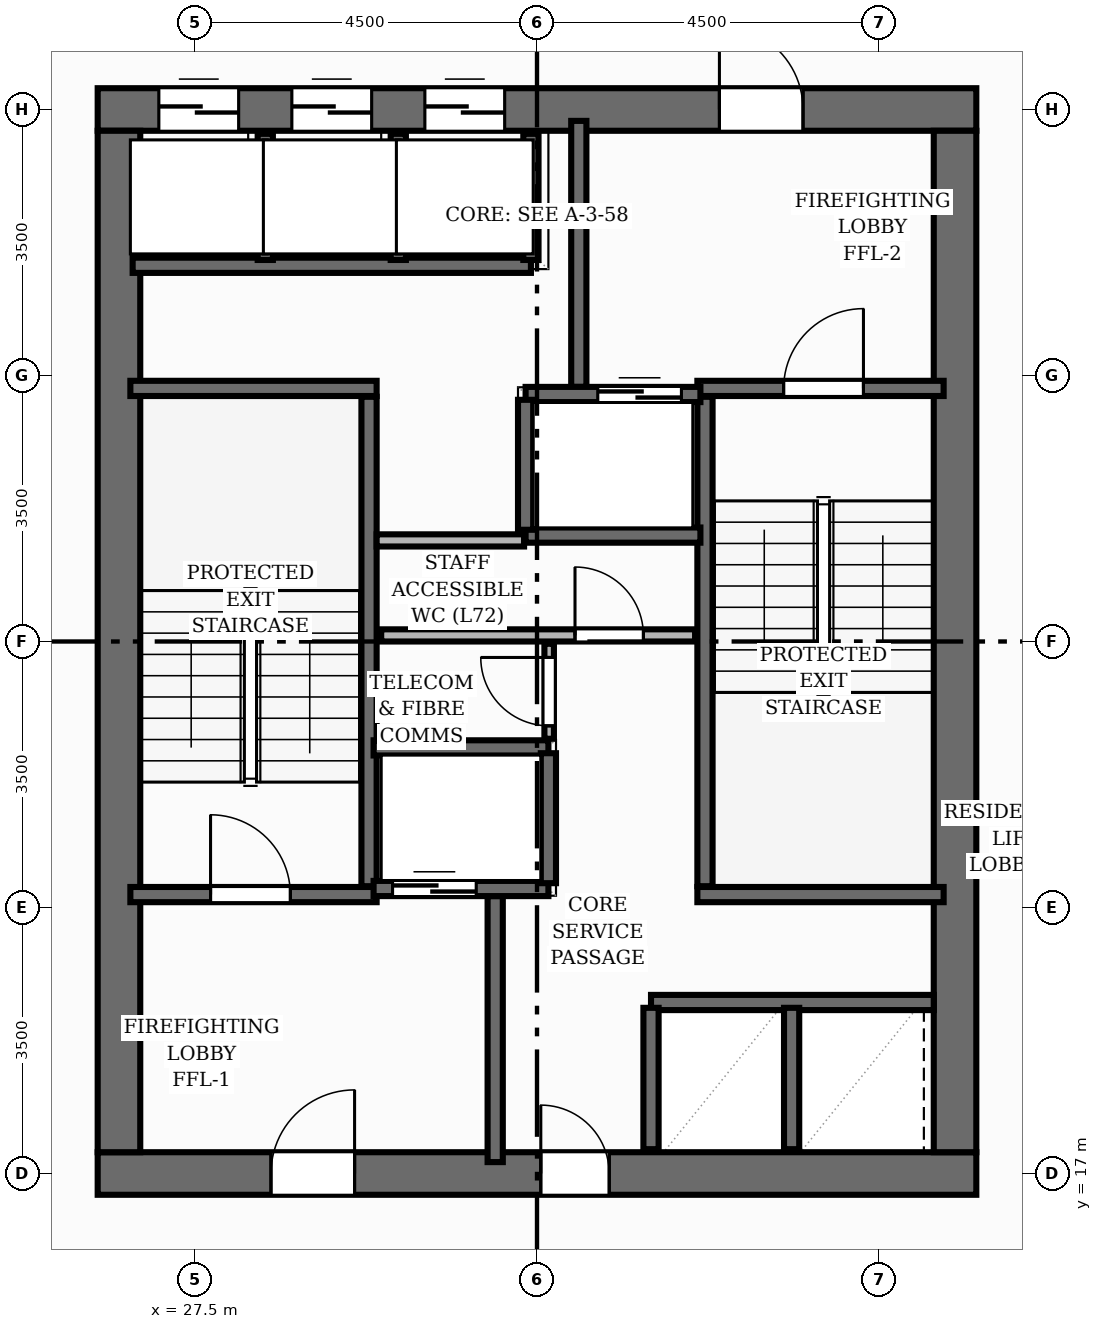
"""IFC4 building model, lengths in metres.
Left out: names, types, materials, properties, quantities, classifications, styles, units other than length and angle.
Written with IfcOpenShell. Run it as: python <this file> out.ifc"""

import sys

from ifc_helpers import new_model, si_unit, direction, frame, frame_2d, origin, place, context, subcontext, project, spatial, rectangle, extrude, element, fill, save


model = new_model("IFC4")
c1 = context("Model", 3, precision=1e-05, world=origin(), true_north=direction((0.0, 1.0)))
c2 = subcontext(c1, "Body", "Model", "MODEL_VIEW")
j1 = project(units=[si_unit("LENGTHUNIT", "METRE"), si_unit("PLANEANGLEUNIT", "RADIAN")], contexts=[c1])
p1 = place(None, origin())
s1 = spatial("IfcSite", under=j1, at=p1, CompositionType="ELEMENT")
p2 = place(p1, origin())
s2 = spatial("IfcBuilding", under=s1, at=p2, CompositionType="ELEMENT")
p3 = place(p2, frame((0.0, 0.0, 239.84)))
s3 = spatial("IfcBuildingStorey", under=s2, at=p3, CompositionType="ELEMENT", Elevation=239.84)
p4 = place(p3, frame((26.22, 17.0, 0.0), z_axis=(0.0, 0.0, 1.0), x_axis=(1.0, 0.0, 0.0)))
e1 = element("IfcWall", 1, at=p4, inside=s3, PredefinedType="SHEAR", context=c2, shape_type="SweptSolid", body=[
    extrude(rectangle(XDim=11.56, YDim=0.56, at=frame_2d((5.78, 0.0))), origin(), (0.0, 0.0, 1.0), 3.2),
])
p5 = place(p4, frame((2.28, 0.0, 0.0)))
e2 = element("IfcOpeningElement", 2, at=p5, cuts=e1, PredefinedType="OPENING", context=c2, shape_type="SweptSolid", body=[
    extrude(rectangle(XDim=1.1, YDim=2.15, at=frame_2d((0.55, 1.075))), frame((0.0, 0.29, 0.0), z_axis=(0.0, -1.0, 0.0), x_axis=(1.0, 0.0, 0.0)), (0.0, 0.0, 1.0), 0.58),
])
p6 = place(p4, frame((5.83, 0.0, 0.0)))
e3 = element("IfcOpeningElement", 3, at=p6, cuts=e1, PredefinedType="OPENING", context=c2, shape_type="SweptSolid", body=[
    extrude(rectangle(XDim=0.9, YDim=2.1, at=frame_2d((0.45, 1.05))), frame((0.0, 0.29, 0.0), z_axis=(0.0, -1.0, 0.0), x_axis=(1.0, 0.0, 0.0)), (0.0, 0.0, 1.0), 0.58),
])
p7 = place(p3, frame((26.22, 31.0, 0.0), z_axis=(0.0, 0.0, 1.0), x_axis=(1.0, 0.0, 0.0)))
e4 = element("IfcWall", 4, at=p7, inside=s3, PredefinedType="SHEAR", context=c2, shape_type="SweptSolid", body=[
    extrude(rectangle(XDim=11.56, YDim=0.56, at=frame_2d((5.78, 0.0))), origin(), (0.0, 0.0, 1.0), 3.2),
])
p8 = place(p7, frame((8.18, 0.0, 0.0)))
e5 = element("IfcOpeningElement", 5, at=p8, cuts=e4, PredefinedType="OPENING", context=c2, shape_type="SweptSolid", body=[
    extrude(rectangle(XDim=1.1, YDim=2.15, at=frame_2d((0.55, 1.075))), frame((0.0, 0.29, 0.0), z_axis=(0.0, -1.0, 0.0), x_axis=(1.0, 0.0, 0.0)), (0.0, 0.0, 1.0), 0.58),
])
p9 = place(p7, frame((0.805, 0.0, 0.0)))
e6 = element("IfcOpeningElement", 6, at=p9, cuts=e4, PredefinedType="OPENING", context=c2, shape_type="SweptSolid", body=[
    extrude(rectangle(XDim=1.05, YDim=2.15, at=frame_2d((0.525, 1.075))), frame((0.0, 0.29, 0.0), z_axis=(0.0, -1.0, 0.0), x_axis=(1.0, 0.0, 0.0)), (0.0, 0.0, 1.0), 0.58),
])
p10 = place(p7, frame((2.555, 0.0, 0.0)))
e7 = element("IfcOpeningElement", 7, at=p10, cuts=e4, PredefinedType="OPENING", context=c2, shape_type="SweptSolid", body=[
    extrude(rectangle(XDim=1.05, YDim=2.15, at=frame_2d((0.525, 1.075))), frame((0.0, 0.29, 0.0), z_axis=(0.0, -1.0, 0.0), x_axis=(1.0, 0.0, 0.0)), (0.0, 0.0, 1.0), 0.58),
])
p11 = place(p7, frame((4.305, 0.0, 0.0)))
e8 = element("IfcOpeningElement", 8, at=p11, cuts=e4, PredefinedType="OPENING", context=c2, shape_type="SweptSolid", body=[
    extrude(rectangle(XDim=1.05, YDim=2.15, at=frame_2d((0.525, 1.075))), frame((0.0, 0.29, 0.0), z_axis=(0.0, -1.0, 0.0), x_axis=(1.0, 0.0, 0.0)), (0.0, 0.0, 1.0), 0.58),
])
for number, where, z_axis, x_axis in (
    (9, (26.5, 17.28, 0.0), (0.0, 0.0, 1.0), (0.0, 1.0, 0.0)),
    (10, (37.5, 17.28, 0.0), (0.0, 0.0, 1.0), (0.0, 1.0, 0.0)),
):
    element("IfcWall", number, at=place(p3, frame(where, z_axis=z_axis, x_axis=x_axis)), inside=s3, PredefinedType="SHEAR", context=c2, shape_type="SweptSolid", body=[
        extrude(rectangle(XDim=13.44, YDim=0.56, at=frame_2d((6.72, 0.0))), origin(), (0.0, 0.0, 1.0), 3.2),
    ])
p12 = place(p3, frame((29.79, 20.78, 0.0), z_axis=(0.0, 0.0, 1.0), x_axis=(0.0, 1.0, 0.0)))
e11 = element("IfcWall", 11, at=p12, inside=s3, PredefinedType="SHEAR", context=c2, shape_type="SweptSolid", body=[
    extrude(rectangle(XDim=6.44, YDim=0.2, at=frame_2d((3.22, 0.0))), origin(), (0.0, 0.0, 1.0), 3.2),
])
p13 = place(p3, frame((26.65, 27.33, 0.0), z_axis=(0.0, 0.0, 1.0), x_axis=(1.0, 0.0, 0.0)))
e12 = element("IfcWall", 12, at=p13, inside=s3, PredefinedType="SHEAR", context=c2, shape_type="SweptSolid", body=[
    extrude(rectangle(XDim=3.24, YDim=0.2, at=frame_2d((1.62, 0.0))), origin(), (0.0, 0.0, 1.0), 3.2),
])
p14 = place(p3, frame((26.65, 20.67, 0.0), z_axis=(0.0, 0.0, 1.0), x_axis=(1.0, 0.0, 0.0)))
e13 = element("IfcWall", 13, at=p14, inside=s3, PredefinedType="SHEAR", context=c2, shape_type="SweptSolid", body=[
    extrude(rectangle(XDim=3.24, YDim=0.2, at=frame_2d((1.62, 0.0))), origin(), (0.0, 0.0, 1.0), 3.2),
])
p15 = place(p14, frame((1.055, 0.0, 0.0)))
e14 = element("IfcOpeningElement", 14, at=p15, cuts=e13, PredefinedType="OPENING", context=c2, shape_type="SweptSolid", body=[
    extrude(rectangle(XDim=1.05, YDim=2.15, at=frame_2d((0.525, 1.075))), frame((0.0, 0.11, 0.0), z_axis=(0.0, -1.0, 0.0), x_axis=(1.0, 0.0, 0.0)), (0.0, 0.0, 1.0), 0.22),
])
p16 = place(p3, frame((34.21, 20.78, 0.0), z_axis=(0.0, 0.0, 1.0), x_axis=(0.0, 1.0, 0.0)))
e15 = element("IfcWall", 15, at=p16, inside=s3, PredefinedType="SHEAR", context=c2, shape_type="SweptSolid", body=[
    extrude(rectangle(XDim=6.44, YDim=0.2, at=frame_2d((3.22, 0.0))), origin(), (0.0, 0.0, 1.0), 3.2),
])
p17 = place(p3, frame((34.11, 20.67, 0.0), z_axis=(0.0, 0.0, 1.0), x_axis=(1.0, 0.0, 0.0)))
e16 = element("IfcWall", 16, at=p17, inside=s3, PredefinedType="SHEAR", context=c2, shape_type="SweptSolid", body=[
    extrude(rectangle(XDim=3.24, YDim=0.2, at=frame_2d((1.62, 0.0))), origin(), (0.0, 0.0, 1.0), 3.2),
])
p18 = place(p3, frame((34.11, 27.33, 0.0), z_axis=(0.0, 0.0, 1.0), x_axis=(1.0, 0.0, 0.0)))
e17 = element("IfcWall", 17, at=p18, inside=s3, PredefinedType="SHEAR", context=c2, shape_type="SweptSolid", body=[
    extrude(rectangle(XDim=3.24, YDim=0.2, at=frame_2d((1.62, 0.0))), origin(), (0.0, 0.0, 1.0), 3.2),
])
p19 = place(p18, frame((1.135, 0.0, 0.0)))
e18 = element("IfcOpeningElement", 18, at=p19, cuts=e17, PredefinedType="OPENING", context=c2, shape_type="SweptSolid", body=[
    extrude(rectangle(XDim=1.05, YDim=2.15, at=frame_2d((0.525, 1.075))), frame((0.0, 0.11, 0.0), z_axis=(0.0, -1.0, 0.0), x_axis=(1.0, 0.0, 0.0)), (0.0, 0.0, 1.0), 0.22),
])
for number, where, z_axis, x_axis in (
    (19, (31.45, 17.15, 0.0), (0.0, 0.0, 1.0), (0.0, 1.0, 0.0)),
    (20, (32.55, 27.35, 0.0), (0.0, 0.0, 1.0), (0.0, 1.0, 0.0)),
):
    element("IfcWall", number, at=place(p3, frame(where, z_axis=z_axis, x_axis=x_axis)), inside=s3, PredefinedType="SHEAR", context=c2, shape_type="SweptSolid", body=[
        extrude(rectangle(XDim=3.5, YDim=0.2, at=frame_2d((1.75, 0.0))), origin(), (0.0, 0.0, 1.0), 3.2),
    ])
p20 = place(p3, frame((29.85, 20.75, 0.0), z_axis=(0.0, 0.0, 1.0), x_axis=(1.0, 0.0, 0.0)))
e21 = element("IfcWall", 21, at=p20, inside=s3, PredefinedType="SHEAR", context=c2, shape_type="SweptSolid", body=[
    extrude(rectangle(XDim=2.3, YDim=0.2, at=frame_2d((1.15, 0.0))), origin(), (0.0, 0.0, 1.0), 3.2),
])
p21 = place(p20, frame((0.25, 0.0, 0.0)))
e22 = element("IfcOpeningElement", 22, at=p21, cuts=e21, PredefinedType="OPENING", context=c2, shape_type="SweptSolid", body=[
    extrude(rectangle(XDim=1.1, YDim=2.15, at=frame_2d((0.55, 1.075))), frame((0.0, 0.11, 0.0), z_axis=(0.0, -1.0, 0.0), x_axis=(1.0, 0.0, 0.0)), (0.0, 0.0, 1.0), 0.22),
])
p22 = place(p3, frame((29.85, 22.6, 0.0), z_axis=(0.0, 0.0, 1.0), x_axis=(1.0, 0.0, 0.0)))
e23 = element("IfcWall", 23, at=p22, inside=s3, PredefinedType="SHEAR", context=c2, shape_type="SweptSolid", body=[
    extrude(rectangle(XDim=2.3, YDim=0.2, at=frame_2d((1.15, 0.0))), origin(), (0.0, 0.0, 1.0), 3.2),
])
p23 = place(p3, frame((32.15, 20.82, 0.0), z_axis=(0.0, 0.0, 1.0), x_axis=(0.0, 1.0, 0.0)))
e24 = element("IfcWall", 24, at=p23, inside=s3, PredefinedType="SHEAR", context=c2, shape_type="SweptSolid", body=[
    extrude(rectangle(XDim=1.71, YDim=0.2, at=frame_2d((0.855, 0.0))), origin(), (0.0, 0.0, 1.0), 3.2),
])
p24 = place(p3, frame((31.85, 27.25, 0.0), z_axis=(0.0, 0.0, 1.0), x_axis=(1.0, 0.0, 0.0)))
e25 = element("IfcWall", 25, at=p24, inside=s3, PredefinedType="SHEAR", context=c2, shape_type="SweptSolid", body=[
    extrude(rectangle(XDim=2.3, YDim=0.2, at=frame_2d((1.15, 0.0))), origin(), (0.0, 0.0, 1.0), 3.2),
])
p25 = place(p24, frame((0.95, 0.0, 0.0)))
e26 = element("IfcOpeningElement", 26, at=p25, cuts=e25, PredefinedType="OPENING", context=c2, shape_type="SweptSolid", body=[
    extrude(rectangle(XDim=1.1, YDim=2.15, at=frame_2d((0.55, 1.075))), frame((0.0, 0.11, 0.0), z_axis=(0.0, -1.0, 0.0), x_axis=(1.0, 0.0, 0.0)), (0.0, 0.0, 1.0), 0.22),
])
p26 = place(p3, frame((31.85, 25.4, 0.0), z_axis=(0.0, 0.0, 1.0), x_axis=(1.0, 0.0, 0.0)))
e27 = element("IfcWall", 27, at=p26, inside=s3, PredefinedType="SHEAR", context=c2, shape_type="SweptSolid", body=[
    extrude(rectangle(XDim=2.3, YDim=0.2, at=frame_2d((1.15, 0.0))), origin(), (0.0, 0.0, 1.0), 3.2),
])
p27 = place(p3, frame((31.85, 25.47, 0.0), z_axis=(0.0, 0.0, 1.0), x_axis=(0.0, 1.0, 0.0)))
e28 = element("IfcWall", 28, at=p27, inside=s3, PredefinedType="SHEAR", context=c2, shape_type="SweptSolid", body=[
    extrude(rectangle(XDim=1.71, YDim=0.2, at=frame_2d((0.855, 0.0))), origin(), (0.0, 0.0, 1.0), 3.2),
])
p28 = place(p3, frame((26.68, 28.95, 0.0), z_axis=(0.0, 0.0, 1.0), x_axis=(1.0, 0.0, 0.0)))
e29 = element("IfcWall", 29, at=p28, inside=s3, PredefinedType="SHEAR", context=c2, shape_type="SweptSolid", body=[
    extrude(rectangle(XDim=5.24, YDim=0.2, at=frame_2d((2.62, 0.0))), origin(), (0.0, 0.0, 1.0), 3.2),
])
for number, where, z_axis, x_axis in (
    (30, (31.92, 29.02, 0.0), (0.0, 0.0, 1.0), (0.0, 1.0, 0.0)),
    (31, (28.425, 29.02, 0.0), (0.0, 0.0, 1.0), (0.0, 1.0, 0.0)),
    (32, (30.175, 29.02, 0.0), (0.0, 0.0, 1.0), (0.0, 1.0, 0.0)),
):
    element("IfcWall", number, at=place(p3, frame(where, z_axis=z_axis, x_axis=x_axis)), inside=s3, PredefinedType="SHEAR", context=c2, shape_type="SweptSolid", body=[
        extrude(rectangle(XDim=1.66, YDim=0.2, at=frame_2d((0.83, 0.0))), origin(), (0.0, 0.0, 1.0), 3.2),
    ])
p29 = place(p3, frame((33.5, 19.25, 0.0), z_axis=(0.0, 0.0, 1.0), x_axis=(1.0, 0.0, 0.0)))
e33 = element("IfcWall", 33, at=p29, inside=s3, PredefinedType="SHEAR", context=c2, shape_type="SweptSolid", body=[
    extrude(rectangle(XDim=3.72, YDim=0.2, at=frame_2d((1.86, 0.0))), origin(), (0.0, 0.0, 1.0), 3.2),
])
for number, where, z_axis, x_axis in (
    (34, (33.5, 17.32, 0.0), (0.0, 0.0, 1.0), (0.0, 1.0, 0.0)),
    (35, (35.35, 17.32, 0.0), (0.0, 0.0, 1.0), (0.0, 1.0, 0.0)),
):
    element("IfcWall", number, at=place(p3, frame(where, z_axis=z_axis, x_axis=x_axis)), inside=s3, PredefinedType="SHEAR", context=c2, shape_type="SweptSolid", body=[
        extrude(rectangle(XDim=1.86, YDim=0.2, at=frame_2d((0.93, 0.0))), origin(), (0.0, 0.0, 1.0), 3.2),
    ])
p30 = place(p3, frame((29.95, 24.08, 0.0), z_axis=(0.0, 0.0, 1.0), x_axis=(1.0, 0.0, 0.0)))
e36 = element("IfcWall", 36, at=p30, inside=s3, PredefinedType="PLUMBINGWALL", context=c2, shape_type="SweptSolid", body=[
    extrude(rectangle(XDim=4.13, YDim=0.16, at=frame_2d((2.065, 0.0))), origin(), (0.0, 0.0, 1.0), 2.875),
])
p31 = place(p30, frame((2.55, 0.0, 0.0)))
e37 = element("IfcOpeningElement", 37, at=p31, cuts=e36, PredefinedType="OPENING", context=c2, shape_type="SweptSolid", body=[
    extrude(rectangle(XDim=0.9, YDim=2.1, at=frame_2d((0.45, 1.05))), frame((0.0, 0.09, 0.0), z_axis=(0.0, -1.0, 0.0), x_axis=(1.0, 0.0, 0.0)), (0.0, 0.0, 1.0), 0.18),
])
p32 = place(p3, frame((32.16, 22.72, 0.0), z_axis=(0.0, 0.0, 1.0), x_axis=(0.0, 1.0, 0.0)))
e38 = element("IfcWall", 38, at=p32, inside=s3, PredefinedType="PARTITIONING", context=c2, shape_type="SweptSolid", body=[
    extrude(rectangle(XDim=1.25, YDim=0.125, at=frame_2d((0.625, 0.0))), origin(), (0.0, 0.0, 1.0), 2.875),
])
p33 = place(p32, frame((0.17, 0.0, 0.0)))
e39 = element("IfcOpeningElement", 39, at=p33, cuts=e38, PredefinedType="OPENING", context=c2, shape_type="SweptSolid", body=[
    extrude(rectangle(XDim=0.9, YDim=2.1, at=frame_2d((0.45, 1.05))), frame((0.0, 0.073, 0.0), z_axis=(0.0, -1.0, 0.0), x_axis=(1.0, 0.0, 0.0)), (0.0, 0.0, 1.0), 0.145),
])
p34 = place(p3, frame((29.89, 25.33, 0.0), z_axis=(0.0, 0.0, 1.0), x_axis=(1.0, 0.0, 0.0)))
e40 = element("IfcWall", 40, at=p34, inside=s3, PredefinedType="PLUMBINGWALL", context=c2, shape_type="SweptSolid", body=[
    extrude(rectangle(XDim=1.94, YDim=0.16, at=frame_2d((0.97, 0.0))), origin(), (0.0, 0.0, 1.0), 2.875),
])
p35 = place(p15, origin())
e41 = element("IfcDoor", 41, at=p35, inside=s3, OperationType="SINGLE_SWING_LEFT", PredefinedType="DOOR", context=c2, shape_type="SweptSolid", body=[
    extrude(rectangle(XDim=1.05, YDim=2.15, at=frame_2d((0.525, 1.075))), frame((0.0, 0.025, 0.0), z_axis=(0.0, -1.0, 0.0), x_axis=(1.0, 0.0, 0.0)), (0.0, 0.0, 1.0), 0.05),
])
fill(e14, e41)
p36 = place(p19, origin())
e42 = element("IfcDoor", 42, at=p36, inside=s3, OperationType="SINGLE_SWING_RIGHT", PredefinedType="DOOR", context=c2, shape_type="SweptSolid", body=[
    extrude(rectangle(XDim=1.05, YDim=2.15, at=frame_2d((0.525, 1.075))), frame((0.0, 0.025, 0.0), z_axis=(0.0, -1.0, 0.0), x_axis=(1.0, 0.0, 0.0)), (0.0, 0.0, 1.0), 0.05),
])
fill(e18, e42)
p37 = place(p5, origin())
e43 = element("IfcDoor", 43, at=p37, inside=s3, OperationType="SINGLE_SWING_RIGHT", PredefinedType="DOOR", context=c2, shape_type="SweptSolid", body=[
    extrude(rectangle(XDim=1.1, YDim=2.15, at=frame_2d((0.55, 1.075))), frame((0.0, 0.025, 0.0), z_axis=(0.0, -1.0, 0.0), x_axis=(1.0, 0.0, 0.0)), (0.0, 0.0, 1.0), 0.05),
])
fill(e2, e43)
p38 = place(p8, origin())
e44 = element("IfcDoor", 44, at=p38, inside=s3, OperationType="SINGLE_SWING_LEFT", PredefinedType="DOOR", context=c2, shape_type="SweptSolid", body=[
    extrude(rectangle(XDim=1.1, YDim=2.15, at=frame_2d((0.55, 1.075))), frame((0.0, 0.025, 0.0), z_axis=(0.0, -1.0, 0.0), x_axis=(1.0, 0.0, 0.0)), (0.0, 0.0, 1.0), 0.05),
])
fill(e5, e44)
p39 = place(p21, origin())
e45 = element("IfcDoor", 45, at=p39, inside=s3, OperationType="DOUBLE_DOOR_SLIDING", PredefinedType="DOOR", context=c2, shape_type="SweptSolid", body=[
    extrude(rectangle(XDim=1.1, YDim=2.15, at=frame_2d((0.55, 1.075))), frame((0.0, 0.025, 0.0), z_axis=(0.0, -1.0, 0.0), x_axis=(1.0, 0.0, 0.0)), (0.0, 0.0, 1.0), 0.05),
])
fill(e22, e45)
p40 = place(p25, origin())
e46 = element("IfcDoor", 46, at=p40, inside=s3, OperationType="DOUBLE_DOOR_SLIDING", PredefinedType="DOOR", context=c2, shape_type="SweptSolid", body=[
    extrude(rectangle(XDim=1.1, YDim=2.15, at=frame_2d((0.55, 1.075))), frame((0.0, 0.025, 0.0), z_axis=(0.0, -1.0, 0.0), x_axis=(1.0, 0.0, 0.0)), (0.0, 0.0, 1.0), 0.05),
])
fill(e26, e46)
p41 = place(p9, origin())
e47 = element("IfcDoor", 47, at=p41, inside=s3, OperationType="DOUBLE_DOOR_SLIDING", PredefinedType="DOOR", context=c2, shape_type="SweptSolid", body=[
    extrude(rectangle(XDim=1.05, YDim=2.15, at=frame_2d((0.525, 1.075))), frame((0.0, 0.025, 0.0), z_axis=(0.0, -1.0, 0.0), x_axis=(1.0, 0.0, 0.0)), (0.0, 0.0, 1.0), 0.05),
])
fill(e6, e47)
p42 = place(p10, origin())
e48 = element("IfcDoor", 48, at=p42, inside=s3, OperationType="DOUBLE_DOOR_SLIDING", PredefinedType="DOOR", context=c2, shape_type="SweptSolid", body=[
    extrude(rectangle(XDim=1.05, YDim=2.15, at=frame_2d((0.525, 1.075))), frame((0.0, 0.025, 0.0), z_axis=(0.0, -1.0, 0.0), x_axis=(1.0, 0.0, 0.0)), (0.0, 0.0, 1.0), 0.05),
])
fill(e7, e48)
p43 = place(p11, origin())
e49 = element("IfcDoor", 49, at=p43, inside=s3, OperationType="DOUBLE_DOOR_SLIDING", PredefinedType="DOOR", context=c2, shape_type="SweptSolid", body=[
    extrude(rectangle(XDim=1.05, YDim=2.15, at=frame_2d((0.525, 1.075))), frame((0.0, 0.025, 0.0), z_axis=(0.0, -1.0, 0.0), x_axis=(1.0, 0.0, 0.0)), (0.0, 0.0, 1.0), 0.05),
])
fill(e8, e49)
p44 = place(p6, origin())
e50 = element("IfcDoor", 50, at=p44, inside=s3, OperationType="SINGLE_SWING_LEFT", PredefinedType="DOOR", context=c2, shape_type="SweptSolid", body=[
    extrude(rectangle(XDim=0.9, YDim=2.1, at=frame_2d((0.45, 1.05))), frame((0.0, 0.025, 0.0), z_axis=(0.0, -1.0, 0.0), x_axis=(1.0, 0.0, 0.0)), (0.0, 0.0, 1.0), 0.05),
])
fill(e3, e50)
p45 = place(p31, origin())
e51 = element("IfcDoor", 51, at=p45, inside=s3, OperationType="SINGLE_SWING_LEFT", PredefinedType="DOOR", context=c2, shape_type="SweptSolid", body=[
    extrude(rectangle(XDim=0.9, YDim=2.1, at=frame_2d((0.45, 1.05))), frame((0.0, 0.025, 0.0), z_axis=(0.0, -1.0, 0.0), x_axis=(1.0, 0.0, 0.0)), (0.0, 0.0, 1.0), 0.05),
])
fill(e37, e51)
p46 = place(p33, origin())
e52 = element("IfcDoor", 52, at=p46, inside=s3, OperationType="SINGLE_SWING_RIGHT", PredefinedType="DOOR", context=c2, shape_type="SweptSolid", body=[
    extrude(rectangle(XDim=0.9, YDim=2.1, at=frame_2d((0.45, 1.05))), frame((0.0, 0.025, 0.0), z_axis=(0.0, -1.0, 0.0), x_axis=(1.0, 0.0, 0.0)), (0.0, 0.0, 1.0), 0.05),
])
fill(e39, e52)
save(model, sys.argv[1])
